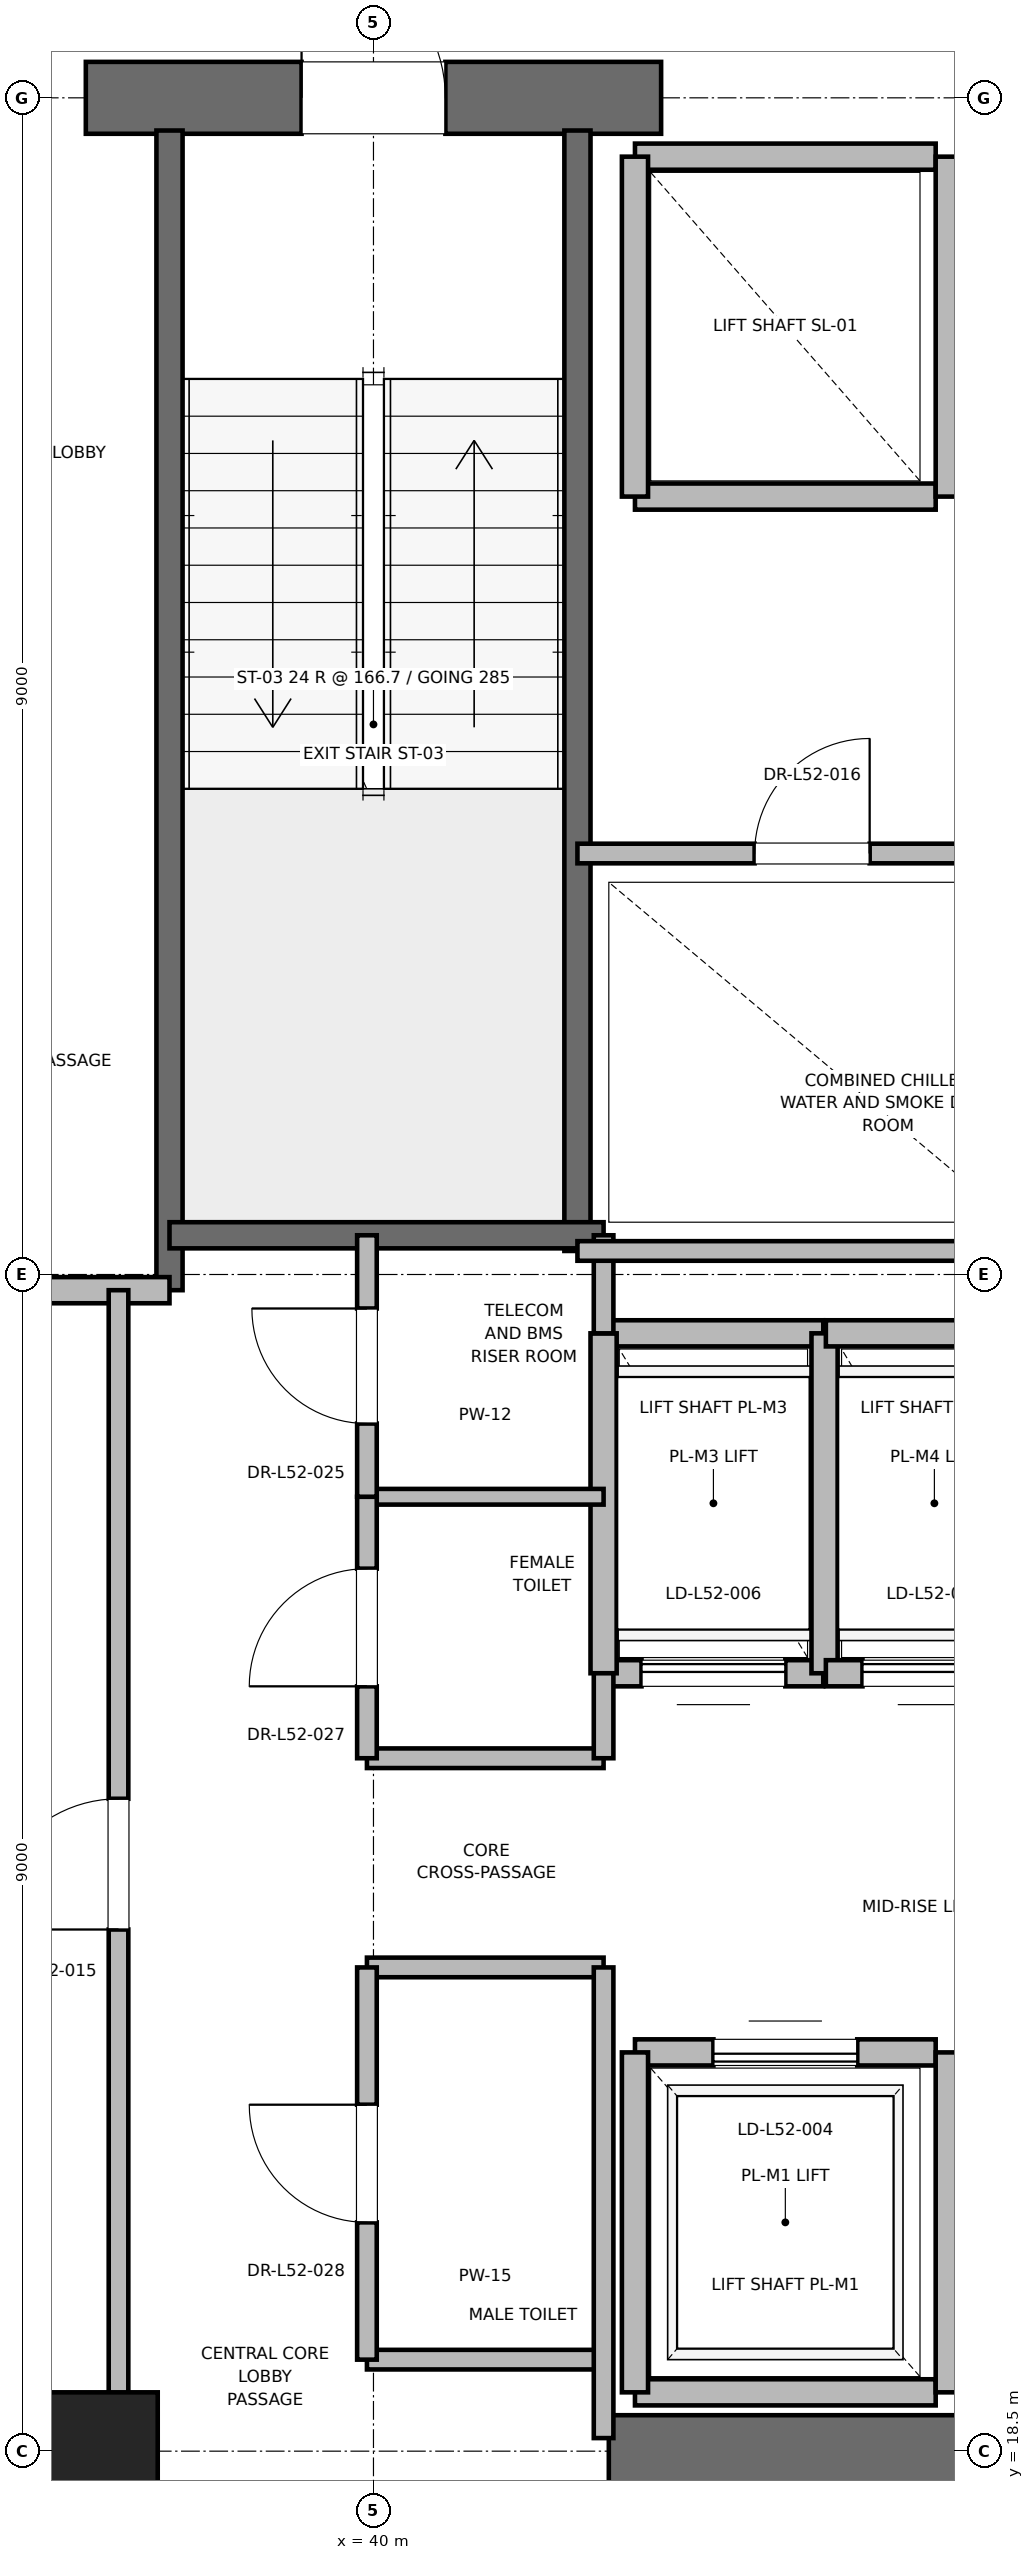
"""IFC4 building model, lengths in metres.
Left out: names, types, materials, properties, quantities, classifications, styles, units other than length and angle.
Written with IfcOpenShell. Run it as: python <this file> out.ifc"""

import sys

from ifc_helpers import new_model, si_unit, direction, frame, frame_2d, origin, origin_2d, place, context, subcontext, project, spatial, rectangle, extrude, element, fill, save


model = new_model("IFC4")
c1 = context("Model", 3, precision=1e-05, world=origin(), true_north=direction((0.0, 1.0)))
c2 = subcontext(c1, "Body", "Model", "MODEL_VIEW")
j1 = project(units=[si_unit("LENGTHUNIT", "METRE"), si_unit("PLANEANGLEUNIT", "RADIAN")], contexts=[c1])
p1 = place(None, origin())
s1 = spatial("IfcSite", under=j1, at=p1, CompositionType="ELEMENT")
p2 = place(p1, origin())
s2 = spatial("IfcBuilding", under=s1, at=p2, CompositionType="ELEMENT")
p3 = place(p2, frame((0.0, 0.0, 225.2)))
s3 = spatial("IfcBuildingStorey", under=s2, at=p3, CompositionType="ELEMENT", Elevation=225.2)
p4 = place(p3, frame((37.9, 18.5, 0.0), z_axis=(0.0, 0.0, 1.0), x_axis=(1.0, 0.0, 0.0)))
e1 = element("IfcColumn", 1, at=p4, inside=s3, PredefinedType="PILASTER", context=c2, shape_type="SweptSolid", body=[
    extrude(rectangle(XDim=0.9, YDim=0.9, at=origin_2d()), origin(), (0.0, 0.0, 1.0), 4.0),
])
for number, where, z_axis, x_axis in (
    (2, (29.0, 18.5, 0.0), (0.0, 0.0, 1.0), (1.0, 0.0, 0.0)),
    (3, (41.8, 18.5, 0.0), (0.0, 0.0, 1.0), (1.0, 0.0, 0.0)),
):
    element("IfcWall", number, at=place(p3, frame(where, z_axis=z_axis, x_axis=x_axis)), inside=s3, PredefinedType="SHEAR", context=c2, shape_type="SweptSolid", body=[
        extrude(rectangle(XDim=9.2, YDim=0.55, at=frame_2d((4.6, 0.0))), origin(), (0.0, 0.0, 1.0), 3.775),
    ])
p5 = place(p3, frame((37.8, 36.5, 0.0), z_axis=(0.0, 0.0, 1.0), x_axis=(1.0, 0.0, 0.0)))
e4 = element("IfcWall", 4, at=p5, inside=s3, PredefinedType="SHEAR", context=c2, shape_type="SweptSolid", body=[
    extrude(rectangle(XDim=4.4, YDim=0.55, at=frame_2d((2.2, 0.0))), origin(), (0.0, 0.0, 1.0), 3.775),
])
p6 = place(p5, frame((1.65, 0.0, 0.0)))
e5 = element("IfcOpeningElement", 5, at=p6, cuts=e4, PredefinedType="OPENING", context=c2, shape_type="SweptSolid", body=[
    extrude(rectangle(XDim=1.1, YDim=2.15, at=frame_2d((0.55, 1.075))), frame((0.0, 0.275, 0.0), z_axis=(0.0, -1.0, 0.0), x_axis=(1.0, 0.0, 0.0)), (0.0, 0.0, 1.0), 0.55),
])
p7 = place(p3, frame((38.44, 27.38, 0.0), z_axis=(0.0, 0.0, 1.0), x_axis=(0.0, 1.0, 0.0)))
e6 = element("IfcWall", 6, at=p7, inside=s3, PredefinedType="SOLIDWALL", context=c2, shape_type="SweptSolid", body=[
    extrude(rectangle(XDim=8.87, YDim=0.2, at=frame_2d((4.435, 0.0))), origin(), (0.0, 0.0, 1.0), 3.775),
])
p8 = place(p3, frame((41.56, 27.68, 0.0), z_axis=(0.0, 0.0, 1.0), x_axis=(0.0, 1.0, 0.0)))
e7 = element("IfcWall", 7, at=p8, inside=s3, PredefinedType="SOLIDWALL", context=c2, shape_type="SweptSolid", body=[
    extrude(rectangle(XDim=8.57, YDim=0.2, at=frame_2d((4.285, 0.0))), origin(), (0.0, 0.0, 1.0), 3.775),
])
p9 = place(p3, frame((38.44, 27.8, 0.0), z_axis=(0.0, 0.0, 1.0), x_axis=(1.0, 0.0, 0.0)))
e8 = element("IfcWall", 8, at=p9, inside=s3, PredefinedType="SOLIDWALL", context=c2, shape_type="SweptSolid", body=[
    extrude(rectangle(XDim=3.32, YDim=0.2, at=frame_2d((1.66, 0.0))), origin(), (0.0, 0.0, 1.0), 3.775),
])
p10 = place(p3, frame((32.82, 27.38, 0.0), z_axis=(0.0, 0.0, 1.0), x_axis=(1.0, 0.0, 0.0)))
e9 = element("IfcWall", 9, at=p10, inside=s3, PredefinedType="PARTITIONING", context=c2, shape_type="SweptSolid", body=[
    extrude(rectangle(XDim=5.62, YDim=0.2, at=frame_2d((2.81, 0.0))), origin(), (0.0, 0.0, 1.0), 3.775),
])
p11 = place(p3, frame((42.0, 18.95, 0.0), z_axis=(0.0, 0.0, 1.0), x_axis=(1.0, 0.0, 0.0)))
e10 = element("IfcWall", 10, at=p11, inside=s3, PredefinedType="SOLIDWALL", context=c2, shape_type="SweptSolid", body=[
    extrude(rectangle(XDim=2.3, YDim=0.2, at=frame_2d((1.15, 0.0))), origin(), (0.0, 0.0, 1.0), 2.755),
])
p12 = place(p3, frame((44.3, 21.55, 0.0), z_axis=(0.0, 0.0, 1.0), x_axis=(-1.0, 0.0, 0.0)))
e11 = element("IfcWall", 11, at=p12, inside=s3, PredefinedType="SOLIDWALL", context=c2, shape_type="SweptSolid", body=[
    extrude(rectangle(XDim=2.3, YDim=0.2, at=frame_2d((1.15, 0.0))), origin(), (0.0, 0.0, 1.0), 3.775),
])
p13 = place(p12, frame((0.6, 0.0, 0.0)))
e12 = element("IfcOpeningElement", 12, at=p13, cuts=e11, PredefinedType="OPENING", context=c2, shape_type="SweptSolid", body=[
    extrude(rectangle(XDim=1.1, YDim=2.2, at=frame_2d((0.55, 1.1))), frame((0.0, 0.1, 0.0), z_axis=(0.0, -1.0, 0.0), x_axis=(1.0, 0.0, 0.0)), (0.0, 0.0, 1.0), 0.2),
])
p14 = place(p3, frame((42.0, 21.55, 0.0), z_axis=(0.0, 0.0, 1.0), x_axis=(0.0, -1.0, 0.0)))
e13 = element("IfcWall", 13, at=p14, inside=s3, PredefinedType="SOLIDWALL", context=c2, shape_type="SweptSolid", body=[
    extrude(rectangle(XDim=2.6, YDim=0.2, at=frame_2d((1.3, 0.0))), origin(), (0.0, 0.0, 1.0), 2.755),
])
p15 = place(p3, frame((44.4, 18.95, 0.0), z_axis=(0.0, 0.0, 1.0), x_axis=(0.0, 1.0, 0.0)))
e14 = element("IfcWall", 14, at=p15, inside=s3, PredefinedType="SOLIDWALL", context=c2, shape_type="SweptSolid", body=[
    extrude(rectangle(XDim=2.6, YDim=0.2, at=frame_2d((1.3, 0.0))), origin(), (0.0, 0.0, 1.0), 3.775),
])
p16 = place(p3, frame((41.76, 24.45, 0.0), z_axis=(0.0, 0.0, 1.0), x_axis=(1.0, 0.0, 0.0)))
e15 = element("IfcWall", 15, at=p16, inside=s3, PredefinedType="SOLIDWALL", context=c2, shape_type="SweptSolid", body=[
    extrude(rectangle(XDim=1.68, YDim=0.2, at=frame_2d((0.84, 0.0))), origin(), (0.0, 0.0, 1.0), 3.775),
])
p17 = place(p16, frame((0.29, 0.0, 0.0)))
e16 = element("IfcOpeningElement", 16, at=p17, cuts=e15, PredefinedType="OPENING", context=c2, shape_type="SweptSolid", body=[
    extrude(rectangle(XDim=1.1, YDim=2.2, at=frame_2d((0.55, 1.1))), frame((0.0, 0.1, 0.0), z_axis=(0.0, -1.0, 0.0), x_axis=(1.0, 0.0, 0.0)), (0.0, 0.0, 1.0), 0.2),
])
p18 = place(p3, frame((43.44, 27.05, 0.0), z_axis=(0.0, 0.0, 1.0), x_axis=(-1.0, 0.0, 0.0)))
e17 = element("IfcWall", 17, at=p18, inside=s3, PredefinedType="SOLIDWALL", context=c2, shape_type="SweptSolid", body=[
    extrude(rectangle(XDim=1.68, YDim=0.2, at=frame_2d((0.84, 0.0))), origin(), (0.0, 0.0, 1.0), 3.775),
])
for number, where, z_axis, x_axis in (
    (18, (41.76, 27.05, 0.0), (0.0, 0.0, 1.0), (0.0, -1.0, 0.0)),
    (19, (43.45, 24.45, 0.0), (0.0, 0.0, 1.0), (0.0, 1.0, 0.0)),
):
    element("IfcWall", number, at=place(p3, frame(where, z_axis=z_axis, x_axis=x_axis)), inside=s3, PredefinedType="SOLIDWALL", context=c2, shape_type="SweptSolid", body=[
        extrude(rectangle(XDim=2.6, YDim=0.2, at=frame_2d((1.3, 0.0))), origin(), (0.0, 0.0, 1.0), 3.775),
    ])
p19 = place(p3, frame((43.46, 24.45, 0.0), z_axis=(0.0, 0.0, 1.0), x_axis=(1.0, 0.0, 0.0)))
e20 = element("IfcWall", 20, at=p19, inside=s3, PredefinedType="SOLIDWALL", context=c2, shape_type="SweptSolid", body=[
    extrude(rectangle(XDim=1.66, YDim=0.2, at=frame_2d((0.83, 0.0))), origin(), (0.0, 0.0, 1.0), 3.775),
])
p20 = place(p19, frame((0.28, 0.0, 0.0)))
e21 = element("IfcOpeningElement", 21, at=p20, cuts=e20, PredefinedType="OPENING", context=c2, shape_type="SweptSolid", body=[
    extrude(rectangle(XDim=1.1, YDim=2.2, at=frame_2d((0.55, 1.1))), frame((0.0, 0.1, 0.0), z_axis=(0.0, -1.0, 0.0), x_axis=(1.0, 0.0, 0.0)), (0.0, 0.0, 1.0), 0.2),
])
p21 = place(p3, frame((45.12, 27.05, 0.0), z_axis=(0.0, 0.0, 1.0), x_axis=(-1.0, 0.0, 0.0)))
e22 = element("IfcWall", 22, at=p21, inside=s3, PredefinedType="SOLIDWALL", context=c2, shape_type="SweptSolid", body=[
    extrude(rectangle(XDim=1.66, YDim=0.2, at=frame_2d((0.83, 0.0))), origin(), (0.0, 0.0, 1.0), 3.775),
])
p22 = place(p3, frame((42.0, 33.45, 0.0), z_axis=(0.0, 0.0, 1.0), x_axis=(1.0, 0.0, 0.0)))
e23 = element("IfcWall", 23, at=p22, inside=s3, PredefinedType="SOLIDWALL", context=c2, shape_type="SweptSolid", body=[
    extrude(rectangle(XDim=2.3, YDim=0.2, at=frame_2d((1.15, 0.0))), origin(), (0.0, 0.0, 1.0), 3.775),
])
p23 = place(p3, frame((44.3, 36.05, 0.0), z_axis=(0.0, 0.0, 1.0), x_axis=(-1.0, 0.0, 0.0)))
e24 = element("IfcWall", 24, at=p23, inside=s3, PredefinedType="SOLIDWALL", context=c2, shape_type="SweptSolid", body=[
    extrude(rectangle(XDim=2.3, YDim=0.2, at=frame_2d((1.15, 0.0))), origin(), (0.0, 0.0, 1.0), 2.755),
])
for number, where, z_axis, x_axis in (
    (25, (42.0, 36.05, 0.0), (0.0, 0.0, 1.0), (0.0, -1.0, 0.0)),
    (26, (44.4, 33.45, 0.0), (0.0, 0.0, 1.0), (0.0, 1.0, 0.0)),
):
    element("IfcWall", number, at=place(p3, frame(where, z_axis=z_axis, x_axis=x_axis)), inside=s3, PredefinedType="SOLIDWALL", context=c2, shape_type="SweptSolid", body=[
        extrude(rectangle(XDim=2.6, YDim=0.2, at=frame_2d((1.3, 0.0))), origin(), (0.0, 0.0, 1.0), 2.755),
    ])
for number, where, z_axis, x_axis in (
    (27, (39.95, 19.2, 0.0), (0.0, 0.0, 1.0), (1.0, 0.0, 0.0)),
    (28, (39.95, 22.2, 0.0), (0.0, 0.0, 1.0), (1.0, 0.0, 0.0)),
    (29, (39.95, 23.8, 0.0), (0.0, 0.0, 1.0), (1.0, 0.0, 0.0)),
):
    element("IfcWall", number, at=place(p3, frame(where, z_axis=z_axis, x_axis=x_axis)), inside=s3, PredefinedType="PARTITIONING", context=c2, shape_type="SweptSolid", body=[
        extrude(rectangle(XDim=1.81, YDim=0.15, at=frame_2d((0.905, 0.0))), origin(), (0.0, 0.0, 1.0), 2.85),
    ])
p24 = place(p3, frame((39.95, 25.8, 0.0), z_axis=(0.0, 0.0, 1.0), x_axis=(1.0, 0.0, 0.0)))
e30 = element("IfcWall", 30, at=p24, inside=s3, PredefinedType="PARTITIONING", context=c2, shape_type="SweptSolid", body=[
    extrude(rectangle(XDim=1.81, YDim=0.12, at=frame_2d((0.905, 0.0))), origin(), (0.0, 0.0, 1.0), 2.85),
])
p25 = place(p3, frame((41.76, 18.6, 0.0), z_axis=(0.0, 0.0, 1.0), x_axis=(0.0, 1.0, 0.0)))
e31 = element("IfcWall", 31, at=p25, inside=s3, PredefinedType="PARTITIONING", context=c2, shape_type="SweptSolid", body=[
    extrude(rectangle(XDim=3.6, YDim=0.15, at=frame_2d((1.8, 0.0))), origin(), (0.0, 0.0, 1.0), 2.755),
])
p26 = place(p3, frame((41.76, 23.8, 0.0), z_axis=(0.0, 0.0, 1.0), x_axis=(0.0, 1.0, 0.0)))
e32 = element("IfcWall", 32, at=p26, inside=s3, PredefinedType="PARTITIONING", context=c2, shape_type="SweptSolid", body=[
    extrude(rectangle(XDim=0.65, YDim=0.15, at=frame_2d((0.325, 0.0))), origin(), (0.0, 0.0, 1.0), 2.85),
])
p27 = place(p3, frame((41.76, 27.05, 0.0), z_axis=(0.0, 0.0, 1.0), x_axis=(0.0, 1.0, 0.0)))
e33 = element("IfcWall", 33, at=p27, inside=s3, PredefinedType="PARTITIONING", context=c2, shape_type="SweptSolid", body=[
    extrude(rectangle(XDim=0.75, YDim=0.15, at=frame_2d((0.375, 0.0))), origin(), (0.0, 0.0, 1.0), 2.85),
])
p28 = place(p3, frame((39.95, 19.2, 0.0), z_axis=(0.0, 0.0, 1.0), x_axis=(0.0, 1.0, 0.0)))
e34 = element("IfcWall", 34, at=p28, inside=s3, PredefinedType="PARTITIONING", context=c2, shape_type="SweptSolid", body=[
    extrude(rectangle(XDim=3.0, YDim=0.15, at=frame_2d((1.5, 0.0))), origin(), (0.0, 0.0, 1.0), 2.85),
])
p29 = place(p28, frame((1.05, 0.0, 0.0)))
e35 = element("IfcOpeningElement", 35, at=p29, cuts=e34, PredefinedType="OPENING", context=c2, shape_type="SweptSolid", body=[
    extrude(rectangle(XDim=0.9, YDim=2.1, at=frame_2d((0.45, 1.05))), frame((0.0, 0.075, 0.0), z_axis=(0.0, -1.0, 0.0), x_axis=(1.0, 0.0, 0.0)), (0.0, 0.0, 1.0), 0.15),
])
p30 = place(p3, frame((39.95, 23.8, 0.0), z_axis=(0.0, 0.0, 1.0), x_axis=(0.0, 1.0, 0.0)))
e36 = element("IfcWall", 36, at=p30, inside=s3, PredefinedType="PARTITIONING", context=c2, shape_type="SweptSolid", body=[
    extrude(rectangle(XDim=2.0, YDim=0.15, at=frame_2d((1.0, 0.0))), origin(), (0.0, 0.0, 1.0), 2.85),
])
p31 = place(p30, frame((0.55, 0.0, 0.0)))
e37 = element("IfcOpeningElement", 37, at=p31, cuts=e36, PredefinedType="OPENING", context=c2, shape_type="SweptSolid", body=[
    extrude(rectangle(XDim=0.9, YDim=2.1, at=frame_2d((0.45, 1.05))), frame((0.0, 0.075, 0.0), z_axis=(0.0, -1.0, 0.0), x_axis=(1.0, 0.0, 0.0)), (0.0, 0.0, 1.0), 0.15),
])
p32 = place(p3, frame((39.95, 25.8, 0.0), z_axis=(0.0, 0.0, 1.0), x_axis=(0.0, 1.0, 0.0)))
e38 = element("IfcWall", 38, at=p32, inside=s3, PredefinedType="PARTITIONING", context=c2, shape_type="SweptSolid", body=[
    extrude(rectangle(XDim=2.0, YDim=0.15, at=frame_2d((1.0, 0.0))), origin(), (0.0, 0.0, 1.0), 2.85),
])
p33 = place(p32, frame((0.56, 0.0, 0.0)))
e39 = element("IfcOpeningElement", 39, at=p33, cuts=e38, PredefinedType="OPENING", context=c2, shape_type="SweptSolid", body=[
    extrude(rectangle(XDim=0.88, YDim=2.1, at=frame_2d((0.44, 1.05))), frame((0.0, 0.075, 0.0), z_axis=(0.0, -1.0, 0.0), x_axis=(1.0, 0.0, 0.0)), (0.0, 0.0, 1.0), 0.15),
])
p34 = place(p3, frame((38.05, 18.6, 0.0), z_axis=(0.0, 0.0, 1.0), x_axis=(0.0, 1.0, 0.0)))
e40 = element("IfcWall", 40, at=p34, inside=s3, PredefinedType="PARTITIONING", context=c2, shape_type="SweptSolid", body=[
    extrude(rectangle(XDim=8.78, YDim=0.15, at=frame_2d((4.39, 0.0))), origin(), (0.0, 0.0, 1.0), 2.755),
])
p35 = place(p34, frame((3.89, 0.0, 0.0)))
e41 = element("IfcOpeningElement", 41, at=p35, cuts=e40, PredefinedType="OPENING", context=c2, shape_type="SweptSolid", body=[
    extrude(rectangle(XDim=1.0, YDim=2.15, at=frame_2d((0.5, 1.075))), frame((0.0, 0.075, 0.0), z_axis=(0.0, -1.0, 0.0), x_axis=(1.0, 0.0, 0.0)), (0.0, 0.0, 1.0), 0.15),
])
p36 = place(p3, frame((41.56, 27.68, 0.0), z_axis=(0.0, 0.0, 1.0), x_axis=(1.0, 0.0, 0.0)))
e42 = element("IfcWall", 42, at=p36, inside=s3, PredefinedType="PARTITIONING", context=c2, shape_type="SweptSolid", body=[
    extrude(rectangle(XDim=3.59, YDim=0.15, at=frame_2d((1.795, 0.0))), origin(), (0.0, 0.0, 1.0), 2.85),
])
p37 = place(p3, frame((41.56, 30.72, 0.0), z_axis=(0.0, 0.0, 1.0), x_axis=(1.0, 0.0, 0.0)))
e43 = element("IfcWall", 43, at=p37, inside=s3, PredefinedType="PARTITIONING", context=c2, shape_type="SweptSolid", body=[
    extrude(rectangle(XDim=3.59, YDim=0.15, at=frame_2d((1.795, 0.0))), origin(), (0.0, 0.0, 1.0), 2.85),
])
p38 = place(p37, frame((1.355, 0.0, 0.0)))
e44 = element("IfcOpeningElement", 44, at=p38, cuts=e43, PredefinedType="OPENING", context=c2, shape_type="SweptSolid", body=[
    extrude(rectangle(XDim=0.88, YDim=2.1, at=frame_2d((0.44, 1.05))), frame((0.0, 0.075, 0.0), z_axis=(0.0, -1.0, 0.0), x_axis=(1.0, 0.0, 0.0)), (0.0, 0.0, 1.0), 0.15),
])
p39 = place(p6, origin())
e45 = element("IfcDoor", 45, at=p39, inside=s3, OperationType="SINGLE_SWING_LEFT", PredefinedType="DOOR", context=c2, shape_type="SweptSolid", body=[
    extrude(rectangle(XDim=1.1, YDim=2.15, at=frame_2d((0.55, 1.075))), frame((0.0, 0.025, 0.0), z_axis=(0.0, -1.0, 0.0), x_axis=(1.0, 0.0, 0.0)), (0.0, 0.0, 1.0), 0.05),
])
fill(e5, e45)
p40 = place(p13, origin())
e46 = element("IfcDoor", 46, at=p40, inside=s3, OperationType="SLIDING_TO_RIGHT", PredefinedType="DOOR", context=c2, shape_type="SweptSolid", body=[
    extrude(rectangle(XDim=1.1, YDim=2.2, at=frame_2d((0.55, 1.1))), frame((0.0, 0.025, 0.0), z_axis=(0.0, -1.0, 0.0), x_axis=(1.0, 0.0, 0.0)), (0.0, 0.0, 1.0), 0.05),
])
fill(e12, e46)
p41 = place(p17, origin())
e47 = element("IfcDoor", 47, at=p41, inside=s3, OperationType="SLIDING_TO_RIGHT", PredefinedType="DOOR", context=c2, shape_type="SweptSolid", body=[
    extrude(rectangle(XDim=1.1, YDim=2.2, at=frame_2d((0.55, 1.1))), frame((0.0, 0.025, 0.0), z_axis=(0.0, -1.0, 0.0), x_axis=(1.0, 0.0, 0.0)), (0.0, 0.0, 1.0), 0.05),
])
fill(e16, e47)
p42 = place(p20, origin())
e48 = element("IfcDoor", 48, at=p42, inside=s3, OperationType="SLIDING_TO_RIGHT", PredefinedType="DOOR", context=c2, shape_type="SweptSolid", body=[
    extrude(rectangle(XDim=1.1, YDim=2.2, at=frame_2d((0.55, 1.1))), frame((0.0, 0.025, 0.0), z_axis=(0.0, -1.0, 0.0), x_axis=(1.0, 0.0, 0.0)), (0.0, 0.0, 1.0), 0.05),
])
fill(e21, e48)
p43 = place(p29, origin())
e49 = element("IfcDoor", 49, at=p43, inside=s3, OperationType="SINGLE_SWING_RIGHT", PredefinedType="DOOR", context=c2, shape_type="SweptSolid", body=[
    extrude(rectangle(XDim=0.9, YDim=2.1, at=frame_2d((0.45, 1.05))), frame((0.0, 0.025, 0.0), z_axis=(0.0, -1.0, 0.0), x_axis=(1.0, 0.0, 0.0)), (0.0, 0.0, 1.0), 0.05),
])
fill(e35, e49)
p44 = place(p31, origin())
e50 = element("IfcDoor", 50, at=p44, inside=s3, OperationType="SINGLE_SWING_LEFT", PredefinedType="DOOR", context=c2, shape_type="SweptSolid", body=[
    extrude(rectangle(XDim=0.9, YDim=2.1, at=frame_2d((0.45, 1.05))), frame((0.0, 0.025, 0.0), z_axis=(0.0, -1.0, 0.0), x_axis=(1.0, 0.0, 0.0)), (0.0, 0.0, 1.0), 0.05),
])
fill(e37, e50)
p45 = place(p33, origin())
e51 = element("IfcDoor", 51, at=p45, inside=s3, OperationType="SINGLE_SWING_RIGHT", PredefinedType="DOOR", context=c2, shape_type="SweptSolid", body=[
    extrude(rectangle(XDim=0.88, YDim=2.1, at=frame_2d((0.44, 1.05))), frame((0.0, 0.025, 0.0), z_axis=(0.0, -1.0, 0.0), x_axis=(1.0, 0.0, 0.0)), (0.0, 0.0, 1.0), 0.05),
])
fill(e39, e51)
p46 = place(p35, origin())
e52 = element("IfcDoor", 52, at=p46, inside=s3, OperationType="SINGLE_SWING_LEFT", PredefinedType="DOOR", context=c2, shape_type="SweptSolid", body=[
    extrude(rectangle(XDim=1.0, YDim=2.15, at=frame_2d((0.5, 1.075))), frame((0.0, 0.025, 0.0), z_axis=(0.0, -1.0, 0.0), x_axis=(1.0, 0.0, 0.0)), (0.0, 0.0, 1.0), 0.05),
])
fill(e41, e52)
p47 = place(p38, origin())
e53 = element("IfcDoor", 53, at=p47, inside=s3, OperationType="SINGLE_SWING_RIGHT", PredefinedType="DOOR", context=c2, shape_type="SweptSolid", body=[
    extrude(rectangle(XDim=0.88, YDim=2.1, at=frame_2d((0.44, 1.05))), frame((0.0, 0.025, 0.0), z_axis=(0.0, -1.0, 0.0), x_axis=(1.0, 0.0, 0.0)), (0.0, 0.0, 1.0), 0.05),
])
fill(e44, e53)
save(model, sys.argv[1])
